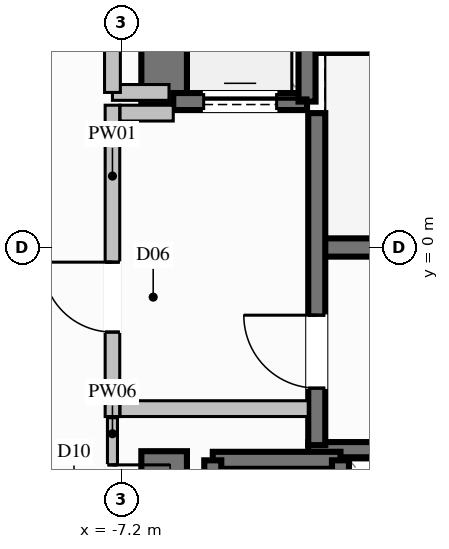
"""IFC4 building model, lengths in metres.
Left out: names, types, materials, properties, quantities, classifications, styles, units other than length and angle.
Written with IfcOpenShell. Run it as: python <this file> out.ifc"""

import sys

from ifc_helpers import new_model, si_unit, direction, frame, frame_2d, origin, place, context, subcontext, project, spatial, rectangle, extrude, element, fill, save


model = new_model("IFC4")
c1 = context("Model", 3, precision=1e-05, world=origin(), true_north=direction((0.0, 1.0)))
c2 = subcontext(c1, "Body", "Model", "MODEL_VIEW")
j1 = project(units=[si_unit("LENGTHUNIT", "METRE"), si_unit("PLANEANGLEUNIT", "RADIAN")], contexts=[c1])
p1 = place(None, origin())
s1 = spatial("IfcSite", under=j1, at=p1, CompositionType="ELEMENT")
p2 = place(p1, origin())
s2 = spatial("IfcBuilding", under=s1, at=p2, CompositionType="ELEMENT")
p3 = place(p2, frame((0.0, 0.0, 60.8)))
s3 = spatial("IfcBuildingStorey", under=s2, at=p3, CompositionType="ELEMENT", Elevation=60.8)
p4 = place(p3, frame((-3.99, 0.0, 0.0), z_axis=(0.0, 0.0, 1.0), x_axis=(1.0, 0.0, 0.0)))
e1 = element("IfcWall", 1, at=p4, inside=s3, PredefinedType="SHEAR", context=c2, shape_type="SweptSolid", body=[
    extrude(rectangle(XDim=7.98, YDim=0.3, at=frame_2d((3.99, 0.0))), origin(), (0.0, 0.0, 1.0), 3.6),
])
for number, where, z_axis, x_axis in (
    (2, (-4.13, -3.325, 0.0), (0.0, 0.0, 1.0), (1.0, 0.0, 0.0)),
    (3, (-4.13, 3.325, 0.0), (0.0, 0.0, 1.0), (1.0, 0.0, 0.0)),
):
    element("IfcWall", number, at=place(p3, frame(where, z_axis=z_axis, x_axis=x_axis)), inside=s3, PredefinedType="SOLIDWALL", context=c2, shape_type="SweptSolid", body=[
        extrude(rectangle(XDim=8.26, YDim=0.25, at=frame_2d((4.13, 0.0))), origin(), (0.0, 0.0, 1.0), 3.6),
    ])
p5 = place(p3, frame((-6.5, 2.35, 0.0), z_axis=(0.0, 0.0, 1.0), x_axis=(0.0, 1.0, 0.0)))
e4 = element("IfcWall", 4, at=p5, inside=s3, PredefinedType="SHEAR", context=c2, shape_type="SweptSolid", body=[
    extrude(rectangle(XDim=4.125, YDim=0.75, at=frame_2d((2.062, 0.0))), origin(), (0.0, 0.0, 1.0), 3.6),
])
p6 = place(p3, frame((-6.5, -6.475, 0.0), z_axis=(0.0, 0.0, 1.0), x_axis=(0.0, 1.0, 0.0)))
e5 = element("IfcWall", 5, at=p6, inside=s3, PredefinedType="SHEAR", context=c2, shape_type="SweptSolid", body=[
    extrude(rectangle(XDim=3.125, YDim=0.75, at=frame_2d((1.562, 0.0))), origin(), (0.0, 0.0, 1.0), 3.6),
])
p7 = place(p3, frame((-3.6, -3.5, 0.0), z_axis=(0.0, 0.0, 1.0), x_axis=(-1.0, 0.0, 0.0)))
e6 = element("IfcWall", 6, at=p7, inside=s3, PredefinedType="SOLIDWALL", context=c2, shape_type="SweptSolid", body=[
    extrude(rectangle(XDim=2.1, YDim=0.28, at=frame_2d((1.05, 0.0))), origin(), (0.0, 0.0, 1.0), 3.34),
])
for number, where, z_axis, x_axis in (
    (7, (-5.7, -3.5, 0.0), (0.0, 0.0, 1.0), (0.0, -1.0, 0.0)),
    (8, (-3.6, -6.0, 0.0), (0.0, 0.0, 1.0), (0.0, 1.0, 0.0)),
):
    element("IfcWall", number, at=place(p3, frame(where, z_axis=z_axis, x_axis=x_axis)), inside=s3, PredefinedType="SOLIDWALL", context=c2, shape_type="SweptSolid", body=[
        extrude(rectangle(XDim=2.5, YDim=0.28, at=frame_2d((1.25, 0.0))), origin(), (0.0, 0.0, 1.0), 3.34),
    ])
p8 = place(p3, frame((-6.35, 2.4, 0.0), z_axis=(0.0, 0.0, 1.0), x_axis=(1.0, 0.0, 0.0)))
e9 = element("IfcWall", 9, at=p8, inside=s3, PredefinedType="SOLIDWALL", context=c2, shape_type="SweptSolid", body=[
    extrude(rectangle(XDim=2.2, YDim=0.28, at=frame_2d((1.1, 0.0))), origin(), (0.0, 0.0, 1.0), 3.34),
])
p9 = place(p8, frame((0.5, 0.0, 0.0)))
e10 = element("IfcOpeningElement", 10, at=p9, cuts=e9, PredefinedType="OPENING", context=c2, shape_type="SweptSolid", body=[
    extrude(rectangle(XDim=1.2, YDim=2.2, at=frame_2d((0.6, 1.1))), frame((0.0, 0.15, 0.0), z_axis=(0.0, -1.0, 0.0), x_axis=(1.0, 0.0, 0.0)), (0.0, 0.0, 1.0), 0.3),
])
p10 = place(p3, frame((-4.15, 2.4, 0.0), z_axis=(0.0, 0.0, 1.0), x_axis=(0.0, 1.0, 0.0)))
e11 = element("IfcWall", 11, at=p10, inside=s3, PredefinedType="SOLIDWALL", context=c2, shape_type="SweptSolid", body=[
    extrude(rectangle(XDim=2.7, YDim=0.28, at=frame_2d((1.35, 0.0))), origin(), (0.0, 0.0, 1.0), 3.34),
])
p11 = place(p3, frame((-3.99, -3.25, 0.0), z_axis=(0.0, 0.0, 1.0), x_axis=(0.0, 1.0, 0.0)))
e12 = element("IfcWall", 12, at=p11, inside=s3, PredefinedType="SOLIDWALL", context=c2, shape_type="SweptSolid", body=[
    extrude(rectangle(XDim=5.46, YDim=0.28, at=frame_2d((2.73, 0.0))), origin(), (0.0, 0.0, 1.0), 3.34),
])
p12 = place(p11, frame((0.937, 0.0, 0.0)))
e13 = element("IfcOpeningElement", 13, at=p12, cuts=e12, PredefinedType="OPENING", context=c2, shape_type="SweptSolid", body=[
    extrude(rectangle(XDim=1.2, YDim=2.2, at=frame_2d((0.6, 1.1))), frame((0.0, 0.15, 0.0), z_axis=(0.0, -1.0, 0.0), x_axis=(1.0, 0.0, 0.0)), (0.0, 0.0, 1.0), 0.3),
])
p13 = place(p3, frame((-7.35, -2.78, 0.0), z_axis=(0.0, 0.0, 1.0), x_axis=(0.0, 1.0, 0.0)))
e14 = element("IfcWall", 14, at=p13, inside=s3, PredefinedType="PARTITIONING", context=c2, shape_type="SweptSolid", body=[
    extrude(rectangle(XDim=5.12, YDim=0.24, at=frame_2d((2.56, 0.0))), origin(), (0.0, 0.0, 1.0), 2.425),
])
p14 = place(p13, frame((1.389, 0.0, 0.0)))
e15 = element("IfcOpeningElement", 15, at=p14, cuts=e14, PredefinedType="OPENING", context=c2, shape_type="SweptSolid", body=[
    extrude(rectangle(XDim=1.15, YDim=2.2, at=frame_2d((0.575, 1.1))), frame((0.0, 0.13, 0.0), z_axis=(0.0, -1.0, 0.0), x_axis=(1.0, 0.0, 0.0)), (0.0, 0.0, 1.0), 0.26),
])
p15 = place(p3, frame((-7.225, -2.65, 0.0), z_axis=(0.0, 0.0, 1.0), x_axis=(1.0, 0.0, 0.0)))
e16 = element("IfcWall", 16, at=p15, inside=s3, PredefinedType="PARTITIONING", context=c2, shape_type="SweptSolid", body=[
    extrude(rectangle(XDim=3.095, YDim=0.26, at=frame_2d((1.548, 0.0))), origin(), (0.0, 0.0, 1.0), 3.34),
])
p16 = place(p3, frame((-7.225, 2.21, 0.0), z_axis=(0.0, 0.0, 1.0), x_axis=(1.0, 0.0, 0.0)))
e17 = element("IfcWall", 17, at=p16, inside=s3, PredefinedType="PARTITIONING", context=c2, shape_type="SweptSolid", body=[
    extrude(rectangle(XDim=0.875, YDim=0.26, at=frame_2d((0.438, 0.0))), origin(), (0.0, 0.0, 1.0), 3.34),
])
p17 = place(p3, frame((-7.35, 2.55, 0.0), z_axis=(0.0, 0.0, 1.0), x_axis=(1.0, 0.0, 0.0)))
e18 = element("IfcWall", 18, at=p17, inside=s3, PredefinedType="PARTITIONING", context=c2, shape_type="SweptSolid", body=[
    extrude(rectangle(XDim=0.93, YDim=0.26, at=frame_2d((0.465, 0.0))), origin(), (0.0, 0.0, 1.0), 3.34),
])
p18 = place(p3, frame((-7.35, 2.55, 0.0), z_axis=(0.0, 0.0, 1.0), x_axis=(0.0, 1.0, 0.0)))
e19 = element("IfcWall", 19, at=p18, inside=s3, PredefinedType="PARTITIONING", context=c2, shape_type="SweptSolid", body=[
    extrude(rectangle(XDim=2.4, YDim=0.26, at=frame_2d((1.2, 0.0))), origin(), (0.0, 0.0, 1.0), 2.425),
])
p19 = place(p18, frame((0.775, 0.0, 0.0)))
e20 = element("IfcOpeningElement", 20, at=p19, cuts=e19, PredefinedType="OPENING", context=c2, shape_type="SweptSolid", body=[
    extrude(rectangle(XDim=0.85, YDim=2.05, at=frame_2d((0.425, 1.025))), frame((0.0, 0.14, 0.0), z_axis=(0.0, -1.0, 0.0), x_axis=(1.0, 0.0, 0.0)), (0.0, 0.0, 1.0), 0.28),
])
p20 = place(p3, frame((-7.35, -2.8, 0.0), z_axis=(0.0, 0.0, 1.0), x_axis=(0.0, -1.0, 0.0)))
e21 = element("IfcWall", 21, at=p20, inside=s3, PredefinedType="PARTITIONING", context=c2, shape_type="SweptSolid", body=[
    extrude(rectangle(XDim=2.5, YDim=0.165, at=frame_2d((1.25, 0.0))), origin(), (0.0, 0.0, 1.0), 3.34),
])
p21 = place(p20, frame((0.775, 0.0, 0.0)))
e22 = element("IfcOpeningElement", 22, at=p21, cuts=e21, PredefinedType="OPENING", context=c2, shape_type="SweptSolid", body=[
    extrude(rectangle(XDim=0.95, YDim=2.1, at=frame_2d((0.475, 1.05))), frame((0.0, 0.093, 0.0), z_axis=(0.0, -1.0, 0.0), x_axis=(1.0, 0.0, 0.0)), (0.0, 0.0, 1.0), 0.185),
])
p22 = place(p9, origin())
e23 = element("IfcDoor", 23, at=p22, inside=s3, OperationType="SLIDING_TO_LEFT", PredefinedType="DOOR", context=c2, shape_type="SweptSolid", body=[
    extrude(rectangle(XDim=1.2, YDim=2.2, at=frame_2d((0.6, 1.1))), frame((0.0, 0.025, 0.0), z_axis=(0.0, -1.0, 0.0), x_axis=(1.0, 0.0, 0.0)), (0.0, 0.0, 1.0), 0.05),
])
fill(e10, e23)
p23 = place(p12, origin())
e24 = element("IfcDoor", 24, at=p23, inside=s3, OperationType="SINGLE_SWING_RIGHT", PredefinedType="DOOR", context=c2, shape_type="SweptSolid", body=[
    extrude(rectangle(XDim=1.2, YDim=2.2, at=frame_2d((0.6, 1.1))), frame((0.0, 0.025, 0.0), z_axis=(0.0, -1.0, 0.0), x_axis=(1.0, 0.0, 0.0)), (0.0, 0.0, 1.0), 0.05),
])
fill(e13, e24)
p24 = place(p14, origin())
e25 = element("IfcDoor", 25, at=p24, inside=s3, OperationType="SINGLE_SWING_RIGHT", PredefinedType="DOOR", context=c2, shape_type="SweptSolid", body=[
    extrude(rectangle(XDim=1.15, YDim=2.2, at=frame_2d((0.575, 1.1))), frame((0.0, 0.025, 0.0), z_axis=(0.0, -1.0, 0.0), x_axis=(1.0, 0.0, 0.0)), (0.0, 0.0, 1.0), 0.05),
])
fill(e15, e25)
p25 = place(p21, origin())
e26 = element("IfcDoor", 26, at=p25, inside=s3, OperationType="SINGLE_SWING_LEFT", PredefinedType="DOOR", context=c2, shape_type="SweptSolid", body=[
    extrude(rectangle(XDim=0.95, YDim=2.1, at=frame_2d((0.475, 1.05))), frame((0.0, 0.025, 0.0), z_axis=(0.0, -1.0, 0.0), x_axis=(1.0, 0.0, 0.0)), (0.0, 0.0, 1.0), 0.05),
])
fill(e22, e26)
save(model, sys.argv[1])
